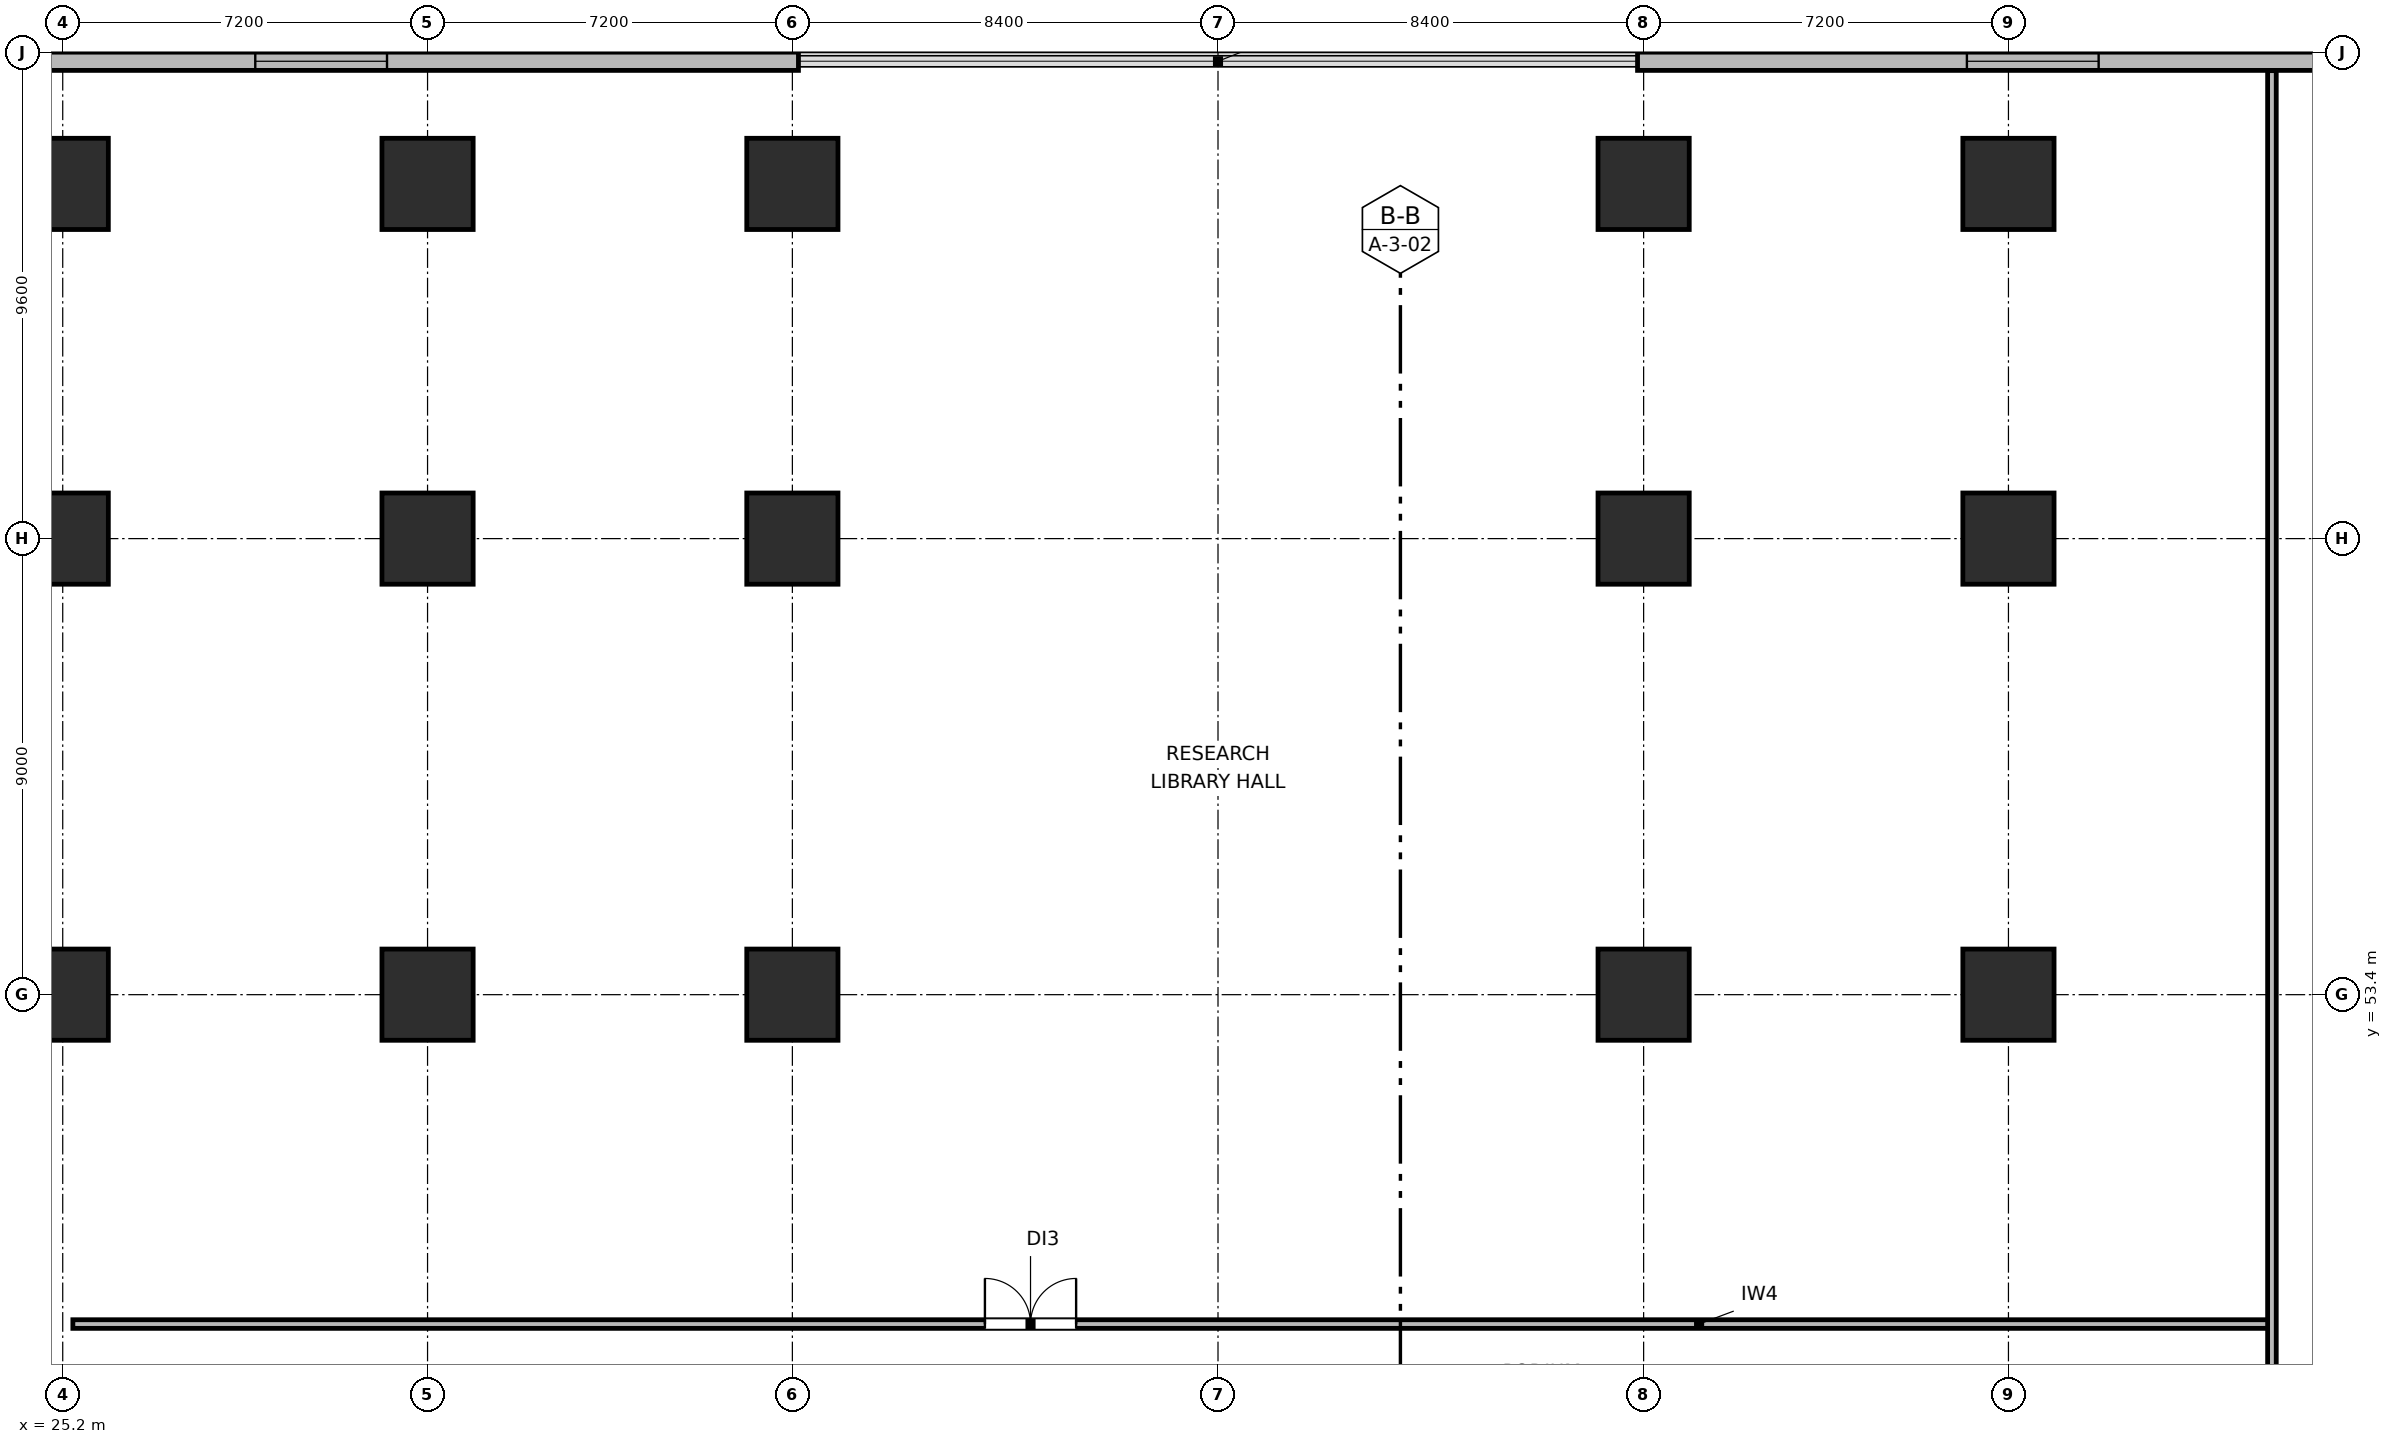
"""IFC4 building model, lengths in metres.
Left out: names, types, materials, properties, quantities, classifications, styles, units other than length and angle.
Written with IfcOpenShell. Run it as: python <this file> out.ifc"""

import sys

from ifc_helpers import new_model, si_unit, direction, frame, frame_2d, origin, origin_2d, place, context, subcontext, project, spatial, rectangle, extrude, element, fill, save


model = new_model("IFC4")
c1 = context("Model", 3, precision=1e-05, world=origin(), true_north=direction((0.0, 1.0)))
c2 = subcontext(c1, "Body", "Model", "MODEL_VIEW")
j1 = project(units=[si_unit("LENGTHUNIT", "METRE"), si_unit("PLANEANGLEUNIT", "RADIAN")], contexts=[c1])
p1 = place(None, origin())
s1 = spatial("IfcSite", under=j1, at=p1, CompositionType="ELEMENT")
p2 = place(p1, origin())
s2 = spatial("IfcBuilding", under=s1, at=p2, CompositionType="ELEMENT")
p3 = place(p2, frame((0.0, 0.0, 12.9)))
s3 = spatial("IfcBuildingStorey", under=s2, at=p3, CompositionType="ELEMENT", Elevation=12.9)
for number, where, z_axis, x_axis in (
    (1, (25.2, 53.4, 0.0), (0.0, 0.0, 1.0), (1.0, 0.0, 0.0)),
    (2, (25.2, 62.4, 0.0), (0.0, 0.0, 1.0), (1.0, 0.0, 0.0)),
    (3, (25.2, 69.4, 0.0), (0.0, 0.0, 1.0), (1.0, 0.0, 0.0)),
    (4, (32.4, 53.4, 0.0), (0.0, 0.0, 1.0), (1.0, 0.0, 0.0)),
    (5, (32.4, 62.4, 0.0), (0.0, 0.0, 1.0), (1.0, 0.0, 0.0)),
    (6, (32.4, 69.4, 0.0), (0.0, 0.0, 1.0), (1.0, 0.0, 0.0)),
    (7, (39.6, 53.4, 0.0), (0.0, 0.0, 1.0), (1.0, 0.0, 0.0)),
    (8, (39.6, 62.4, 0.0), (0.0, 0.0, 1.0), (1.0, 0.0, 0.0)),
    (9, (39.6, 69.4, 0.0), (0.0, 0.0, 1.0), (1.0, 0.0, 0.0)),
    (10, (56.4, 53.4, 0.0), (0.0, 0.0, 1.0), (1.0, 0.0, 0.0)),
    (11, (56.4, 62.4, 0.0), (0.0, 0.0, 1.0), (1.0, 0.0, 0.0)),
    (12, (56.4, 69.4, 0.0), (0.0, 0.0, 1.0), (1.0, 0.0, 0.0)),
    (13, (63.6, 53.4, 0.0), (0.0, 0.0, 1.0), (1.0, 0.0, 0.0)),
    (14, (63.6, 62.4, 0.0), (0.0, 0.0, 1.0), (1.0, 0.0, 0.0)),
    (15, (63.6, 69.4, 0.0), (0.0, 0.0, 1.0), (1.0, 0.0, 0.0)),
):
    element("IfcColumn", number, at=place(p3, frame(where, z_axis=z_axis, x_axis=x_axis)), inside=s3, PredefinedType="COLUMN", context=c2, shape_type="SweptSolid", body=[
        extrude(rectangle(XDim=1.8, YDim=1.8, at=origin_2d()), origin(), (0.0, 0.0, 1.0), 4.2),
    ])
p4 = place(p3, frame((0.0, 71.82, 0.0), z_axis=(0.0, 0.0, 1.0), x_axis=(1.0, 0.0, 0.0)))
e16 = element("IfcWall", 16, at=p4, inside=s3, PredefinedType="SOLIDWALL", context=c2, shape_type="SweptSolid", body=[
    extrude(rectangle(XDim=39.72, YDim=0.36, at=frame_2d((19.86, 0.0))), origin(), (0.0, 0.0, 1.0), 3.84),
])
p5 = place(p4, frame((13.0, 0.0, 0.7)))
e17 = element("IfcOpeningElement", 17, at=p5, cuts=e16, PredefinedType="OPENING", context=c2, shape_type="SweptSolid", body=[
    extrude(rectangle(XDim=2.6, YDim=1.6, at=frame_2d((1.3, 0.8))), frame((0.0, 0.19, 0.0), z_axis=(0.0, -1.0, 0.0), x_axis=(1.0, 0.0, 0.0)), (0.0, 0.0, 1.0), 0.38),
])
p6 = place(p4, frame((29.0, 0.0, 0.7)))
e18 = element("IfcOpeningElement", 18, at=p6, cuts=e16, PredefinedType="OPENING", context=c2, shape_type="SweptSolid", body=[
    extrude(rectangle(XDim=2.6, YDim=1.6, at=frame_2d((1.3, 0.8))), frame((0.0, 0.19, 0.0), z_axis=(0.0, -1.0, 0.0), x_axis=(1.0, 0.0, 0.0)), (0.0, 0.0, 1.0), 0.38),
])
p7 = place(p3, frame((56.28, 71.82, 0.0), z_axis=(0.0, 0.0, 1.0), x_axis=(1.0, 0.0, 0.0)))
e19 = element("IfcWall", 19, at=p7, inside=s3, PredefinedType="SOLIDWALL", context=c2, shape_type="SweptSolid", body=[
    extrude(rectangle(XDim=39.72, YDim=0.36, at=frame_2d((19.86, 0.0))), origin(), (0.0, 0.0, 1.0), 3.84),
])
p8 = place(p7, frame((6.5, 0.0, 0.7)))
e20 = element("IfcOpeningElement", 20, at=p8, cuts=e19, PredefinedType="OPENING", context=c2, shape_type="SweptSolid", body=[
    extrude(rectangle(XDim=2.6, YDim=1.6, at=frame_2d((1.3, 0.8))), frame((0.0, 0.19, 0.0), z_axis=(0.0, -1.0, 0.0), x_axis=(1.0, 0.0, 0.0)), (0.0, 0.0, 1.0), 0.38),
])
p9 = place(p7, frame((29.0, 0.0, 0.7)))
e21 = element("IfcOpeningElement", 21, at=p9, cuts=e19, PredefinedType="OPENING", context=c2, shape_type="SweptSolid", body=[
    extrude(rectangle(XDim=2.6, YDim=1.6, at=frame_2d((1.3, 0.8))), frame((0.0, 0.19, 0.0), z_axis=(0.0, -1.0, 0.0), x_axis=(1.0, 0.0, 0.0)), (0.0, 0.0, 1.0), 0.38),
])
p10 = place(p3, frame((25.4, 46.9, 0.0), z_axis=(0.0, 0.0, 1.0), x_axis=(1.0, 0.0, 0.0)))
e22 = element("IfcWall", 22, at=p10, inside=s3, PredefinedType="PARTITIONING", context=c2, shape_type="SweptSolid", body=[
    extrude(rectangle(XDim=43.4, YDim=0.17, at=frame_2d((21.7, 0.0))), origin(), (0.0, 0.0, 1.0), 3.84),
])
p11 = place(p10, frame((18.0, 0.0, 0.0)))
e23 = element("IfcOpeningElement", 23, at=p11, cuts=e22, PredefinedType="OPENING", context=c2, shape_type="SweptSolid", body=[
    extrude(rectangle(XDim=1.8, YDim=2.06, at=frame_2d((0.9, 1.03))), frame((0.0, 0.095, 0.0), z_axis=(0.0, -1.0, 0.0), x_axis=(1.0, 0.0, 0.0)), (0.0, 0.0, 1.0), 0.19),
])
p12 = place(p3, frame((68.8, 25.187, 0.0), z_axis=(0.0, 0.0, 1.0), x_axis=(0.0, 1.0, 0.0)))
e24 = element("IfcWall", 24, at=p12, inside=s3, PredefinedType="PARTITIONING", context=c2, shape_type="SweptSolid", body=[
    extrude(rectangle(XDim=46.448, YDim=0.17, at=frame_2d((23.224, 0.0))), origin(), (0.0, 0.0, 1.0), 3.84),
])
p13 = place(p12, frame((15.913, 0.0, 0.0)))
e25 = element("IfcOpeningElement", 25, at=p13, cuts=e24, PredefinedType="OPENING", context=c2, shape_type="SweptSolid", body=[
    extrude(rectangle(XDim=1.1, YDim=2.05, at=frame_2d((0.55, 1.025))), frame((0.0, 0.095, 0.0), z_axis=(0.0, -1.0, 0.0), x_axis=(1.0, 0.0, 0.0)), (0.0, 0.0, 1.0), 0.19),
])
p14 = place(p6, origin())
e26 = element("IfcWindow", 26, at=p14, inside=s3, PartitioningType="SINGLE_PANEL", PredefinedType="WINDOW", context=c2, shape_type="SweptSolid", body=[
    extrude(rectangle(XDim=2.6, YDim=1.6, at=frame_2d((1.3, 0.8))), frame((0.0, 0.03, 0.0), z_axis=(0.0, -1.0, 0.0), x_axis=(1.0, 0.0, 0.0)), (0.0, 0.0, 1.0), 0.06),
])
fill(e18, e26)
p15 = place(p8, origin())
e27 = element("IfcWindow", 27, at=p15, inside=s3, PartitioningType="SINGLE_PANEL", PredefinedType="WINDOW", context=c2, shape_type="SweptSolid", body=[
    extrude(rectangle(XDim=2.6, YDim=1.6, at=frame_2d((1.3, 0.8))), frame((0.0, 0.03, 0.0), z_axis=(0.0, -1.0, 0.0), x_axis=(1.0, 0.0, 0.0)), (0.0, 0.0, 1.0), 0.06),
])
fill(e20, e27)
p16 = place(p11, origin())
e28 = element("IfcDoor", 28, at=p16, inside=s3, OperationType="DOUBLE_DOOR_SINGLE_SWING", PredefinedType="DOOR", context=c2, shape_type="SweptSolid", body=[
    extrude(rectangle(XDim=1.8, YDim=2.06, at=frame_2d((0.9, 1.03))), frame((0.0, 0.025, 0.0), z_axis=(0.0, -1.0, 0.0), x_axis=(1.0, 0.0, 0.0)), (0.0, 0.0, 1.0), 0.05),
])
fill(e23, e28)
save(model, sys.argv[1])
